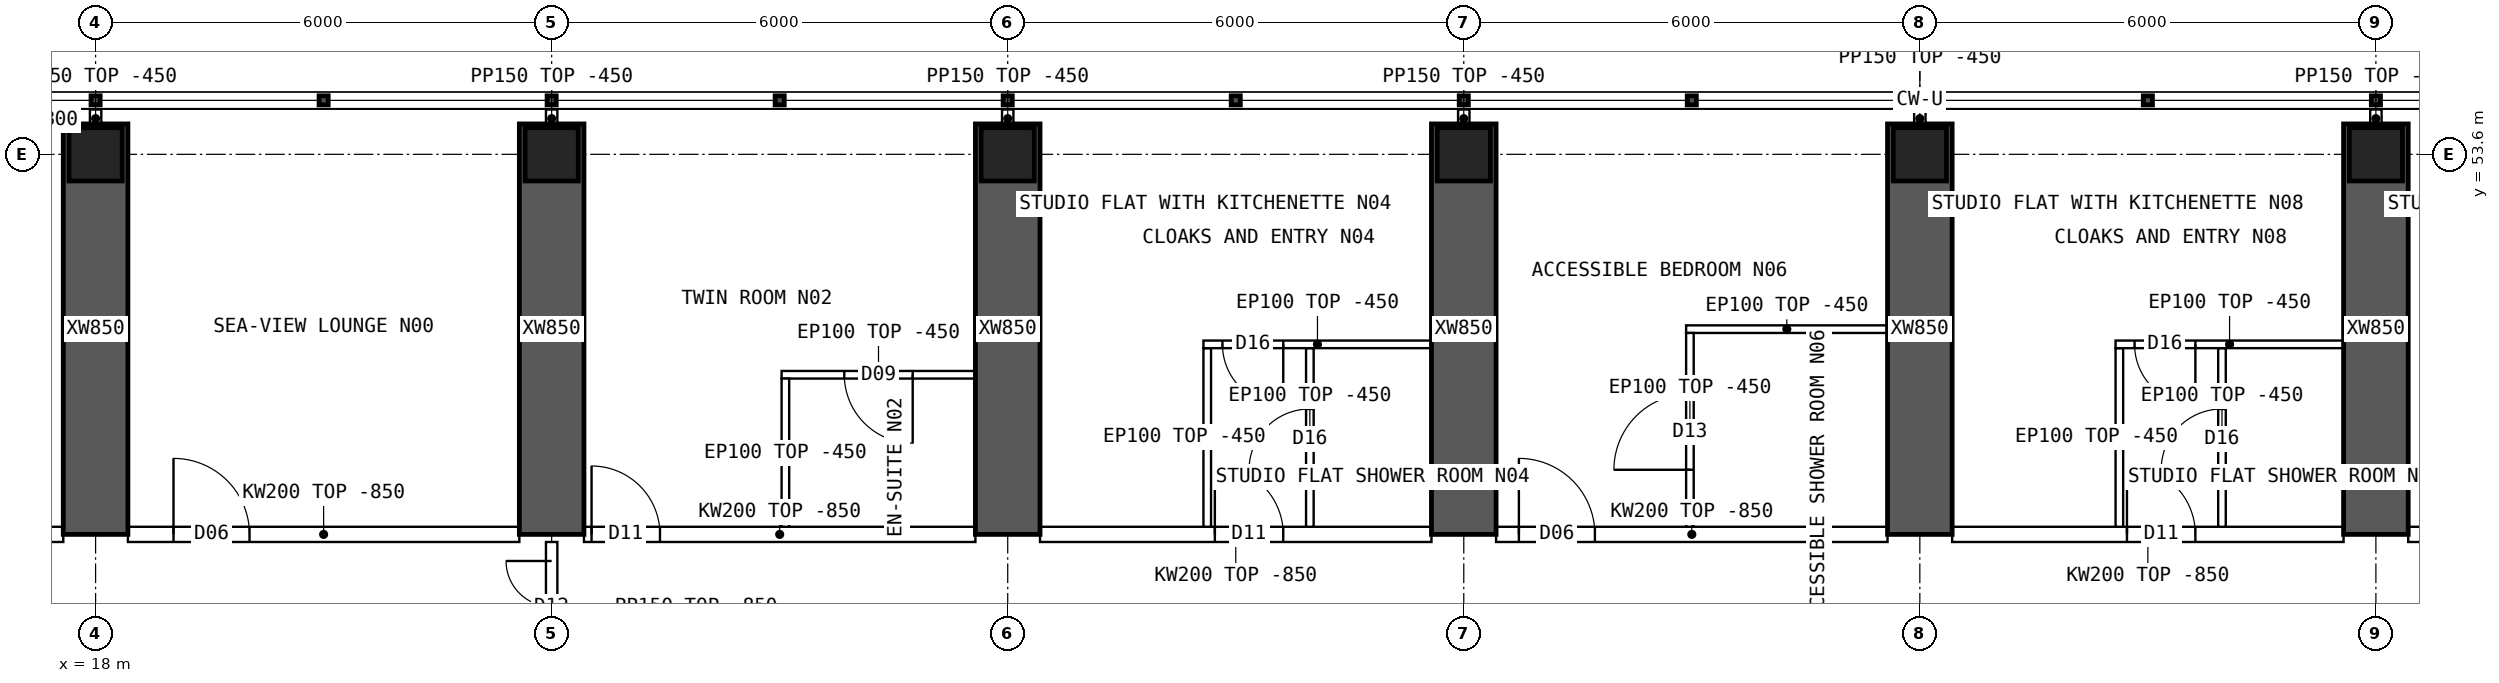
"""IFC4 building model, lengths in metres.
Left out: names, types, materials, properties, quantities, classifications, styles, units other than length and angle.
Written with IfcOpenShell. Run it as: python <this file> out.ifc"""

import sys

from ifc_helpers import new_model, si_unit, direction, frame, frame_2d, origin, origin_2d, place, context, subcontext, project, spatial, polyline, rectangle, hollow_rectangle, outline, extrude, element, fill, save


model = new_model("IFC4")
c1 = context("Model", 3, precision=1e-05, world=origin(), true_north=direction((0.0, 1.0)))
c2 = subcontext(c1, "Body", "Model", "MODEL_VIEW")
j1 = project(units=[si_unit("LENGTHUNIT", "METRE"), si_unit("PLANEANGLEUNIT", "RADIAN")], contexts=[c1])
p1 = place(None, origin())
s1 = spatial("IfcSite", under=j1, at=p1, CompositionType="ELEMENT")
p2 = place(p1, origin())
s2 = spatial("IfcBuilding", under=s1, at=p2, CompositionType="ELEMENT")
p3 = place(p2, frame((0.0, 0.0, 159.85)))
s3 = spatial("IfcBuildingStorey", under=s2, at=p3, CompositionType="ELEMENT", Elevation=159.85)
for number, where, z_axis, x_axis in (
    (1, (18.0, 53.6, 0.0), (0.0, 0.0, 1.0), (1.0, 0.0, 0.0)),
    (2, (24.0, 53.6, 0.0), (0.0, 0.0, 1.0), (1.0, 0.0, 0.0)),
    (3, (30.0, 53.6, 0.0), (0.0, 0.0, 1.0), (1.0, 0.0, 0.0)),
    (4, (36.0, 53.6, 0.0), (0.0, 0.0, 1.0), (1.0, 0.0, 0.0)),
    (5, (42.0, 53.6, 0.0), (0.0, 0.0, 1.0), (1.0, 0.0, 0.0)),
    (6, (48.0, 53.6, 0.0), (0.0, 0.0, 1.0), (1.0, 0.0, 0.0)),
):
    element("IfcColumn", number, at=place(p3, frame(where, z_axis=z_axis, x_axis=x_axis)), inside=s3, PredefinedType="COLUMN", context=c2, shape_type="SweptSolid", body=[
        extrude(hollow_rectangle(XDim=0.7, YDim=0.7, WallThickness=0.07, at=origin_2d()), origin(), (0.0, 0.0, 1.0), 3.75),
    ])
for number, where, z_axis, x_axis in (
    (7, (18.0, 48.6, 0.0), (0.0, 0.0, 1.0), (0.0, 1.0, 0.0)),
    (8, (24.0, 48.6, 0.0), (0.0, 0.0, 1.0), (0.0, 1.0, 0.0)),
    (9, (30.0, 48.6, 0.0), (0.0, 0.0, 1.0), (0.0, 1.0, 0.0)),
    (10, (36.0, 48.6, 0.0), (0.0, 0.0, 1.0), (0.0, 1.0, 0.0)),
    (11, (42.0, 48.6, 0.0), (0.0, 0.0, 1.0), (0.0, 1.0, 0.0)),
    (12, (48.0, 48.6, 0.0), (0.0, 0.0, 1.0), (0.0, 1.0, 0.0)),
):
    element("IfcWall", number, at=place(p3, frame(where, z_axis=z_axis, x_axis=x_axis)), inside=s3, PredefinedType="SHEAR", context=c2, shape_type="SweptSolid", body=[
        extrude(rectangle(XDim=5.4, YDim=0.85, at=frame_2d((2.7, 0.0))), origin(), (0.0, 0.0, 1.0), 3.75),
    ])
p4 = place(p3, frame((17.2, 54.05, 0.0), z_axis=(0.0, 0.0, 1.0), x_axis=(1.0, 0.0, 0.0)))
e13 = element("IfcWall", 13, at=p4, inside=s3, PredefinedType="SOLIDWALL", context=c2, shape_type="SweptSolid", body=[
    extrude(rectangle(XDim=0.375, YDim=0.3, at=frame_2d((0.188, 0.0))), origin(), (0.0, 0.0, 1.0), 3.3),
])
p5 = place(p3, frame((15.6, 48.6, 0.0), z_axis=(0.0, 0.0, 1.0), x_axis=(1.0, 0.0, 0.0)))
e14 = element("IfcWall", 14, at=p5, inside=s3, PredefinedType="SOLIDWALL", context=c2, shape_type="SweptSolid", body=[
    extrude(rectangle(XDim=1.975, YDim=0.2, at=frame_2d((0.987, 0.0))), origin(), (0.0, 0.0, 1.0), 3.3),
])
p6 = place(p5, frame((0.875, 0.0, 0.0)))
e15 = element("IfcOpeningElement", 15, at=p6, cuts=e14, PredefinedType="OPENING", context=c2, shape_type="SweptSolid", body=[
    extrude(rectangle(XDim=0.9, YDim=2.1, at=frame_2d((0.45, 1.05))), frame((0.0, 0.11, 0.0), z_axis=(0.0, -1.0, 0.0), x_axis=(1.0, 0.0, 0.0)), (0.0, 0.0, 1.0), 0.22),
])
p7 = place(p3, frame((18.425, 48.6, 0.0), z_axis=(0.0, 0.0, 1.0), x_axis=(1.0, 0.0, 0.0)))
e16 = element("IfcWall", 16, at=p7, inside=s3, PredefinedType="SOLIDWALL", context=c2, shape_type="SweptSolid", body=[
    extrude(outline(polyline([(0.0, 0.0), (5.15, 0.0), (5.15, 2.9), (0.0, 2.9), (0.0, 0.0)])), frame((0.0, 0.1, 0.0), z_axis=(0.0, -1.0, 0.0), x_axis=(1.0, 0.0, 0.0)), (0.0, 0.0, 1.0), 0.2),
])
p8 = place(p7, frame((0.6, 0.0, 0.0)))
e17 = element("IfcOpeningElement", 17, at=p8, cuts=e16, PredefinedType="OPENING", context=c2, shape_type="SweptSolid", body=[
    extrude(rectangle(XDim=1.0, YDim=2.1, at=frame_2d((0.5, 1.05))), frame((0.0, 0.11, 0.0), z_axis=(0.0, -1.0, 0.0), x_axis=(1.0, 0.0, 0.0)), (0.0, 0.0, 1.0), 0.22),
])
p9 = place(p3, frame((24.425, 48.6, 0.0), z_axis=(0.0, 0.0, 1.0), x_axis=(1.0, 0.0, 0.0)))
e18 = element("IfcWall", 18, at=p9, inside=s3, PredefinedType="SOLIDWALL", context=c2, shape_type="SweptSolid", body=[
    extrude(outline(polyline([(0.0, 0.0), (5.15, 0.0), (5.15, 2.9), (0.0, 2.9), (0.0, 0.0)])), frame((0.0, 0.1, 0.0), z_axis=(0.0, -1.0, 0.0), x_axis=(1.0, 0.0, 0.0)), (0.0, 0.0, 1.0), 0.2),
])
p10 = place(p9, frame((0.1, 0.0, 0.0)))
e19 = element("IfcOpeningElement", 19, at=p10, cuts=e18, PredefinedType="OPENING", context=c2, shape_type="SweptSolid", body=[
    extrude(rectangle(XDim=0.9, YDim=2.1, at=frame_2d((0.45, 1.05))), frame((0.0, 0.11, 0.0), z_axis=(0.0, -1.0, 0.0), x_axis=(1.0, 0.0, 0.0)), (0.0, 0.0, 1.0), 0.22),
])
p11 = place(p3, frame((30.425, 48.6, 0.0), z_axis=(0.0, 0.0, 1.0), x_axis=(1.0, 0.0, 0.0)))
e20 = element("IfcWall", 20, at=p11, inside=s3, PredefinedType="SOLIDWALL", context=c2, shape_type="SweptSolid", body=[
    extrude(outline(polyline([(0.0, 0.0), (5.15, 0.0), (5.15, 2.9), (0.0, 2.9), (0.0, 0.0)])), frame((0.0, 0.1, 0.0), z_axis=(0.0, -1.0, 0.0), x_axis=(1.0, 0.0, 0.0)), (0.0, 0.0, 1.0), 0.2),
])
p12 = place(p11, frame((2.3, 0.0, 0.0)))
e21 = element("IfcOpeningElement", 21, at=p12, cuts=e20, PredefinedType="OPENING", context=c2, shape_type="SweptSolid", body=[
    extrude(rectangle(XDim=0.9, YDim=2.1, at=frame_2d((0.45, 1.05))), frame((0.0, 0.11, 0.0), z_axis=(0.0, -1.0, 0.0), x_axis=(1.0, 0.0, 0.0)), (0.0, 0.0, 1.0), 0.22),
])
p13 = place(p3, frame((36.425, 48.6, 0.0), z_axis=(0.0, 0.0, 1.0), x_axis=(1.0, 0.0, 0.0)))
e22 = element("IfcWall", 22, at=p13, inside=s3, PredefinedType="SOLIDWALL", context=c2, shape_type="SweptSolid", body=[
    extrude(outline(polyline([(0.0, 0.0), (5.15, 0.0), (5.15, 2.9), (0.0, 2.9), (0.0, 0.0)])), frame((0.0, 0.1, 0.0), z_axis=(0.0, -1.0, 0.0), x_axis=(1.0, 0.0, 0.0)), (0.0, 0.0, 1.0), 0.2),
])
p14 = place(p13, frame((0.3, 0.0, 0.0)))
e23 = element("IfcOpeningElement", 23, at=p14, cuts=e22, PredefinedType="OPENING", context=c2, shape_type="SweptSolid", body=[
    extrude(rectangle(XDim=1.0, YDim=2.1, at=frame_2d((0.5, 1.05))), frame((0.0, 0.11, 0.0), z_axis=(0.0, -1.0, 0.0), x_axis=(1.0, 0.0, 0.0)), (0.0, 0.0, 1.0), 0.22),
])
p15 = place(p3, frame((42.425, 48.6, 0.0), z_axis=(0.0, 0.0, 1.0), x_axis=(1.0, 0.0, 0.0)))
e24 = element("IfcWall", 24, at=p15, inside=s3, PredefinedType="SOLIDWALL", context=c2, shape_type="SweptSolid", body=[
    extrude(outline(polyline([(0.0, 0.0), (5.15, 0.0), (5.15, 2.9), (0.0, 2.9), (0.0, 0.0)])), frame((0.0, 0.1, 0.0), z_axis=(0.0, -1.0, 0.0), x_axis=(1.0, 0.0, 0.0)), (0.0, 0.0, 1.0), 0.2),
])
p16 = place(p15, frame((2.3, 0.0, 0.0)))
e25 = element("IfcOpeningElement", 25, at=p16, cuts=e24, PredefinedType="OPENING", context=c2, shape_type="SweptSolid", body=[
    extrude(rectangle(XDim=0.9, YDim=2.1, at=frame_2d((0.45, 1.05))), frame((0.0, 0.11, 0.0), z_axis=(0.0, -1.0, 0.0), x_axis=(1.0, 0.0, 0.0)), (0.0, 0.0, 1.0), 0.22),
])
p17 = place(p3, frame((48.425, 48.6, 0.0), z_axis=(0.0, 0.0, 1.0), x_axis=(1.0, 0.0, 0.0)))
e26 = element("IfcWall", 26, at=p17, inside=s3, PredefinedType="SOLIDWALL", context=c2, shape_type="SweptSolid", body=[
    extrude(outline(polyline([(0.0, 0.0), (5.15, 0.0), (5.15, 2.9), (0.0, 2.9), (0.0, 0.0)])), frame((0.0, 0.1, 0.0), z_axis=(0.0, -1.0, 0.0), x_axis=(1.0, 0.0, 0.0)), (0.0, 0.0, 1.0), 0.2),
])
p18 = place(p17, frame((2.3, 0.0, 0.0)))
e27 = element("IfcOpeningElement", 27, at=p18, cuts=e26, PredefinedType="OPENING", context=c2, shape_type="SweptSolid", body=[
    extrude(rectangle(XDim=0.9, YDim=2.1, at=frame_2d((0.45, 1.05))), frame((0.0, 0.11, 0.0), z_axis=(0.0, -1.0, 0.0), x_axis=(1.0, 0.0, 0.0)), (0.0, 0.0, 1.0), 0.22),
])
p19 = place(p3, frame((27.025, 50.7, 0.0), z_axis=(0.0, 0.0, 1.0), x_axis=(1.0, 0.0, 0.0)))
e28 = element("IfcWall", 28, at=p19, inside=s3, PredefinedType="PARTITIONING", context=c2, shape_type="SweptSolid", body=[
    extrude(rectangle(XDim=2.55, YDim=0.1, at=frame_2d((1.275, 0.0))), origin(), (0.0, 0.0, 1.0), 3.3),
])
p20 = place(p19, frame((0.825, 0.0, 0.0)))
e29 = element("IfcOpeningElement", 29, at=p20, cuts=e28, PredefinedType="OPENING", context=c2, shape_type="SweptSolid", body=[
    extrude(rectangle(XDim=0.9, YDim=2.1, at=frame_2d((0.45, 1.05))), frame((0.0, 0.06, 0.0), z_axis=(0.0, -1.0, 0.0), x_axis=(1.0, 0.0, 0.0)), (0.0, 0.0, 1.0), 0.12),
])
p21 = place(p3, frame((27.075, 50.65, 0.0), z_axis=(0.0, 0.0, 1.0), x_axis=(0.0, -1.0, 0.0)))
e30 = element("IfcWall", 30, at=p21, inside=s3, PredefinedType="PARTITIONING", context=c2, shape_type="SweptSolid", body=[
    extrude(outline(polyline([(0.0, 0.0), (1.95, 0.0), (1.95, 2.9), (1.902, 2.9), (1.9, 3.3), (0.0, 3.3), (0.0, 0.0)])), frame((0.0, 0.05, 0.0), z_axis=(0.0, -1.0, 0.0), x_axis=(1.0, 0.0, 0.0)), (0.0, 0.0, 1.0), 0.1),
])
p22 = place(p3, frame((32.575, 51.1, 0.0), z_axis=(0.0, 0.0, 1.0), x_axis=(1.0, 0.0, 0.0)))
e31 = element("IfcWall", 31, at=p22, inside=s3, PredefinedType="PARTITIONING", context=c2, shape_type="SweptSolid", body=[
    extrude(rectangle(XDim=3.0, YDim=0.1, at=frame_2d((1.5, 0.0))), origin(), (0.0, 0.0, 1.0), 3.3),
])
p23 = place(p22, frame((0.25, 0.0, 0.0)))
e32 = element("IfcOpeningElement", 32, at=p23, cuts=e31, PredefinedType="OPENING", context=c2, shape_type="SweptSolid", body=[
    extrude(rectangle(XDim=0.8, YDim=2.1, at=frame_2d((0.4, 1.05))), frame((0.0, 0.06, 0.0), z_axis=(0.0, -1.0, 0.0), x_axis=(1.0, 0.0, 0.0)), (0.0, 0.0, 1.0), 0.12),
])
p24 = place(p3, frame((32.625, 51.05, 0.0), z_axis=(0.0, 0.0, 1.0), x_axis=(0.0, -1.0, 0.0)))
e33 = element("IfcWall", 33, at=p24, inside=s3, PredefinedType="PARTITIONING", context=c2, shape_type="SweptSolid", body=[
    extrude(outline(polyline([(0.0, 0.0), (2.35, 0.0), (2.35, 2.9), (2.302, 2.9), (2.3, 3.3), (0.0, 3.3), (0.0, 0.0)])), frame((0.0, 0.05, 0.0), z_axis=(0.0, -1.0, 0.0), x_axis=(1.0, 0.0, 0.0)), (0.0, 0.0, 1.0), 0.1),
])
p25 = place(p3, frame((33.975, 51.05, 0.0), z_axis=(0.0, 0.0, 1.0), x_axis=(0.0, -1.0, 0.0)))
e34 = element("IfcWall", 34, at=p25, inside=s3, PredefinedType="PARTITIONING", context=c2, shape_type="SweptSolid", body=[
    extrude(outline(polyline([(0.0, 0.0), (2.35, 0.0), (2.35, 2.9), (2.302, 2.9), (2.3, 3.3), (0.0, 3.3), (0.0, 0.0)])), frame((0.0, 0.05, 0.0), z_axis=(0.0, -1.0, 0.0), x_axis=(1.0, 0.0, 0.0)), (0.0, 0.0, 1.0), 0.1),
])
p26 = place(p25, frame((0.8, 0.0, 0.0)))
e35 = element("IfcOpeningElement", 35, at=p26, cuts=e34, PredefinedType="OPENING", context=c2, shape_type="SweptSolid", body=[
    extrude(rectangle(XDim=0.8, YDim=2.1, at=frame_2d((0.4, 1.05))), frame((0.0, 0.06, 0.0), z_axis=(0.0, -1.0, 0.0), x_axis=(1.0, 0.0, 0.0)), (0.0, 0.0, 1.0), 0.12),
])
p27 = place(p3, frame((38.925, 51.3, 0.0), z_axis=(0.0, 0.0, 1.0), x_axis=(1.0, 0.0, 0.0)))
e36 = element("IfcWall", 36, at=p27, inside=s3, PredefinedType="PARTITIONING", context=c2, shape_type="SweptSolid", body=[
    extrude(rectangle(XDim=2.65, YDim=0.1, at=frame_2d((1.325, 0.0))), origin(), (0.0, 0.0, 1.0), 3.3),
])
p28 = place(p3, frame((38.975, 51.25, 0.0), z_axis=(0.0, 0.0, 1.0), x_axis=(0.0, -1.0, 0.0)))
e37 = element("IfcWall", 37, at=p28, inside=s3, PredefinedType="PARTITIONING", context=c2, shape_type="SweptSolid", body=[
    extrude(outline(polyline([(0.0, 0.0), (2.55, 0.0), (2.55, 2.9), (2.502, 2.9), (2.5, 3.3), (0.0, 3.3), (0.0, 0.0)])), frame((0.0, 0.05, 0.0), z_axis=(0.0, -1.0, 0.0), x_axis=(1.0, 0.0, 0.0)), (0.0, 0.0, 1.0), 0.1),
])
p29 = place(p28, frame((0.8, 0.0, 0.0)))
e38 = element("IfcOpeningElement", 38, at=p29, cuts=e37, PredefinedType="OPENING", context=c2, shape_type="SweptSolid", body=[
    extrude(rectangle(XDim=1.0, YDim=2.1, at=frame_2d((0.5, 1.05))), frame((0.0, 0.06, 0.0), z_axis=(0.0, -1.0, 0.0), x_axis=(1.0, 0.0, 0.0)), (0.0, 0.0, 1.0), 0.12),
])
p30 = place(p3, frame((44.575, 51.1, 0.0), z_axis=(0.0, 0.0, 1.0), x_axis=(1.0, 0.0, 0.0)))
e39 = element("IfcWall", 39, at=p30, inside=s3, PredefinedType="PARTITIONING", context=c2, shape_type="SweptSolid", body=[
    extrude(rectangle(XDim=3.0, YDim=0.1, at=frame_2d((1.5, 0.0))), origin(), (0.0, 0.0, 1.0), 3.3),
])
p31 = place(p30, frame((0.25, 0.0, 0.0)))
e40 = element("IfcOpeningElement", 40, at=p31, cuts=e39, PredefinedType="OPENING", context=c2, shape_type="SweptSolid", body=[
    extrude(rectangle(XDim=0.8, YDim=2.1, at=frame_2d((0.4, 1.05))), frame((0.0, 0.06, 0.0), z_axis=(0.0, -1.0, 0.0), x_axis=(1.0, 0.0, 0.0)), (0.0, 0.0, 1.0), 0.12),
])
p32 = place(p3, frame((44.625, 51.05, 0.0), z_axis=(0.0, 0.0, 1.0), x_axis=(0.0, -1.0, 0.0)))
e41 = element("IfcWall", 41, at=p32, inside=s3, PredefinedType="PARTITIONING", context=c2, shape_type="SweptSolid", body=[
    extrude(outline(polyline([(0.0, 0.0), (2.35, 0.0), (2.35, 2.9), (2.302, 2.9), (2.3, 3.3), (0.0, 3.3), (0.0, 0.0)])), frame((0.0, 0.05, 0.0), z_axis=(0.0, -1.0, 0.0), x_axis=(1.0, 0.0, 0.0)), (0.0, 0.0, 1.0), 0.1),
])
p33 = place(p3, frame((45.975, 51.05, 0.0), z_axis=(0.0, 0.0, 1.0), x_axis=(0.0, -1.0, 0.0)))
e42 = element("IfcWall", 42, at=p33, inside=s3, PredefinedType="PARTITIONING", context=c2, shape_type="SweptSolid", body=[
    extrude(outline(polyline([(0.0, 0.0), (2.35, 0.0), (2.35, 2.9), (2.302, 2.9), (2.3, 3.3), (0.0, 3.3), (0.0, 0.0)])), frame((0.0, 0.05, 0.0), z_axis=(0.0, -1.0, 0.0), x_axis=(1.0, 0.0, 0.0)), (0.0, 0.0, 1.0), 0.1),
])
p34 = place(p33, frame((0.8, 0.0, 0.0)))
e43 = element("IfcOpeningElement", 43, at=p34, cuts=e42, PredefinedType="OPENING", context=c2, shape_type="SweptSolid", body=[
    extrude(rectangle(XDim=0.8, YDim=2.1, at=frame_2d((0.4, 1.05))), frame((0.0, 0.06, 0.0), z_axis=(0.0, -1.0, 0.0), x_axis=(1.0, 0.0, 0.0)), (0.0, 0.0, 1.0), 0.12),
])
p35 = place(p3, frame((24.0, 46.8, 0.0), z_axis=(0.0, 0.0, 1.0), x_axis=(0.0, 1.0, 0.0)))
e44 = element("IfcWall", 44, at=p35, inside=s3, PredefinedType="PARTITIONING", context=c2, shape_type="SweptSolid", body=[
    extrude(outline(polyline([(0.0, 0.0), (1.7, 0.0), (1.7, 2.9), (0.0, 2.9), (0.0, 0.0)])), frame((0.0, 0.075, 0.0), z_axis=(0.0, -1.0, 0.0), x_axis=(1.0, 0.0, 0.0)), (0.0, 0.0, 1.0), 0.15),
])
p36 = place(p35, frame((0.25, 0.0, 0.0)))
e45 = element("IfcOpeningElement", 45, at=p36, cuts=e44, PredefinedType="OPENING", context=c2, shape_type="SweptSolid", body=[
    extrude(rectangle(XDim=1.2, YDim=2.1, at=frame_2d((0.6, 1.05))), frame((0.0, 0.085, 0.0), z_axis=(0.0, -1.0, 0.0), x_axis=(1.0, 0.0, 0.0)), (0.0, 0.0, 1.0), 0.17),
])
for number, where, z_axis, x_axis in (
    (46, (18.0, 53.95, 0.0), (0.0, 0.0, 1.0), (0.0, 1.0, 0.0)),
    (47, (24.0, 53.95, 0.0), (0.0, 0.0, 1.0), (0.0, 1.0, 0.0)),
    (48, (30.0, 53.95, 0.0), (0.0, 0.0, 1.0), (0.0, 1.0, 0.0)),
    (49, (36.0, 53.95, 0.0), (0.0, 0.0, 1.0), (0.0, 1.0, 0.0)),
    (50, (42.0, 53.95, 0.0), (0.0, 0.0, 1.0), (0.0, 1.0, 0.0)),
    (51, (48.0, 53.95, 0.0), (0.0, 0.0, 1.0), (0.0, 1.0, 0.0)),
):
    element("IfcWall", number, at=place(p3, frame(where, z_axis=z_axis, x_axis=x_axis)), inside=s3, PredefinedType="PARTITIONING", context=c2, shape_type="SweptSolid", body=[
        extrude(rectangle(XDim=0.24, YDim=0.15, at=frame_2d((0.12, 0.0))), origin(), (0.0, 0.0, 1.0), 3.3),
    ])
p37 = place(p8, origin())
e52 = element("IfcDoor", 52, at=p37, inside=s3, OperationType="SINGLE_SWING_LEFT", PredefinedType="DOOR", context=c2, shape_type="SweptSolid", body=[
    extrude(rectangle(XDim=1.0, YDim=2.1, at=frame_2d((0.5, 1.05))), frame((0.0, 0.025, 0.0), z_axis=(0.0, -1.0, 0.0), x_axis=(1.0, 0.0, 0.0)), (0.0, 0.0, 1.0), 0.05),
])
fill(e17, e52)
p38 = place(p20, origin())
e53 = element("IfcDoor", 53, at=p38, inside=s3, OperationType="SINGLE_SWING_RIGHT", PredefinedType="DOOR", context=c2, shape_type="SweptSolid", body=[
    extrude(rectangle(XDim=0.9, YDim=2.1, at=frame_2d((0.45, 1.05))), frame((0.0, 0.025, 0.0), z_axis=(0.0, -1.0, 0.0), x_axis=(1.0, 0.0, 0.0)), (0.0, 0.0, 1.0), 0.05),
])
fill(e29, e53)
p39 = place(p10, origin())
e54 = element("IfcDoor", 54, at=p39, inside=s3, OperationType="SINGLE_SWING_LEFT", PredefinedType="DOOR", context=c2, shape_type="SweptSolid", body=[
    extrude(rectangle(XDim=0.9, YDim=2.1, at=frame_2d((0.45, 1.05))), frame((0.0, 0.025, 0.0), z_axis=(0.0, -1.0, 0.0), x_axis=(1.0, 0.0, 0.0)), (0.0, 0.0, 1.0), 0.05),
])
fill(e19, e54)
p40 = place(p23, origin())
e55 = element("IfcDoor", 55, at=p40, inside=s3, OperationType="SINGLE_SWING_RIGHT", PredefinedType="DOOR", context=c2, shape_type="SweptSolid", body=[
    extrude(rectangle(XDim=0.8, YDim=2.1, at=frame_2d((0.4, 1.05))), frame((0.0, 0.025, 0.0), z_axis=(0.0, -1.0, 0.0), x_axis=(1.0, 0.0, 0.0)), (0.0, 0.0, 1.0), 0.05),
])
fill(e32, e55)
p41 = place(p26, origin())
e56 = element("IfcDoor", 56, at=p41, inside=s3, OperationType="SINGLE_SWING_RIGHT", PredefinedType="DOOR", context=c2, shape_type="SweptSolid", body=[
    extrude(rectangle(XDim=0.8, YDim=2.1, at=frame_2d((0.4, 1.05))), frame((0.0, 0.025, 0.0), z_axis=(0.0, -1.0, 0.0), x_axis=(1.0, 0.0, 0.0)), (0.0, 0.0, 1.0), 0.05),
])
fill(e35, e56)
p42 = place(p12, origin())
e57 = element("IfcDoor", 57, at=p42, inside=s3, OperationType="SINGLE_SWING_LEFT", PredefinedType="DOOR", context=c2, shape_type="SweptSolid", body=[
    extrude(rectangle(XDim=0.9, YDim=2.1, at=frame_2d((0.45, 1.05))), frame((0.0, 0.025, 0.0), z_axis=(0.0, -1.0, 0.0), x_axis=(1.0, 0.0, 0.0)), (0.0, 0.0, 1.0), 0.05),
])
fill(e21, e57)
p43 = place(p29, origin())
e58 = element("IfcDoor", 58, at=p43, inside=s3, OperationType="SINGLE_SWING_RIGHT", PredefinedType="DOOR", context=c2, shape_type="SweptSolid", body=[
    extrude(rectangle(XDim=1.0, YDim=2.1, at=frame_2d((0.5, 1.05))), frame((0.0, 0.025, 0.0), z_axis=(0.0, -1.0, 0.0), x_axis=(1.0, 0.0, 0.0)), (0.0, 0.0, 1.0), 0.05),
])
fill(e38, e58)
p44 = place(p14, origin())
e59 = element("IfcDoor", 59, at=p44, inside=s3, OperationType="SINGLE_SWING_LEFT", PredefinedType="DOOR", context=c2, shape_type="SweptSolid", body=[
    extrude(rectangle(XDim=1.0, YDim=2.1, at=frame_2d((0.5, 1.05))), frame((0.0, 0.025, 0.0), z_axis=(0.0, -1.0, 0.0), x_axis=(1.0, 0.0, 0.0)), (0.0, 0.0, 1.0), 0.05),
])
fill(e23, e59)
p45 = place(p31, origin())
e60 = element("IfcDoor", 60, at=p45, inside=s3, OperationType="SINGLE_SWING_RIGHT", PredefinedType="DOOR", context=c2, shape_type="SweptSolid", body=[
    extrude(rectangle(XDim=0.8, YDim=2.1, at=frame_2d((0.4, 1.05))), frame((0.0, 0.025, 0.0), z_axis=(0.0, -1.0, 0.0), x_axis=(1.0, 0.0, 0.0)), (0.0, 0.0, 1.0), 0.05),
])
fill(e40, e60)
p46 = place(p34, origin())
e61 = element("IfcDoor", 61, at=p46, inside=s3, OperationType="SINGLE_SWING_RIGHT", PredefinedType="DOOR", context=c2, shape_type="SweptSolid", body=[
    extrude(rectangle(XDim=0.8, YDim=2.1, at=frame_2d((0.4, 1.05))), frame((0.0, 0.025, 0.0), z_axis=(0.0, -1.0, 0.0), x_axis=(1.0, 0.0, 0.0)), (0.0, 0.0, 1.0), 0.05),
])
fill(e43, e61)
p47 = place(p16, origin())
e62 = element("IfcDoor", 62, at=p47, inside=s3, OperationType="SINGLE_SWING_LEFT", PredefinedType="DOOR", context=c2, shape_type="SweptSolid", body=[
    extrude(rectangle(XDim=0.9, YDim=2.1, at=frame_2d((0.45, 1.05))), frame((0.0, 0.025, 0.0), z_axis=(0.0, -1.0, 0.0), x_axis=(1.0, 0.0, 0.0)), (0.0, 0.0, 1.0), 0.05),
])
fill(e25, e62)
p48 = place(p36, origin())
e63 = element("IfcDoor", 63, at=p48, inside=s3, OperationType="DOUBLE_DOOR_SINGLE_SWING", PredefinedType="DOOR", context=c2, shape_type="SweptSolid", body=[
    extrude(rectangle(XDim=1.2, YDim=2.1, at=frame_2d((0.6, 1.05))), frame((0.0, 0.025, 0.0), z_axis=(0.0, -1.0, 0.0), x_axis=(1.0, 0.0, 0.0)), (0.0, 0.0, 1.0), 0.05),
])
fill(e45, e63)
save(model, sys.argv[1])
